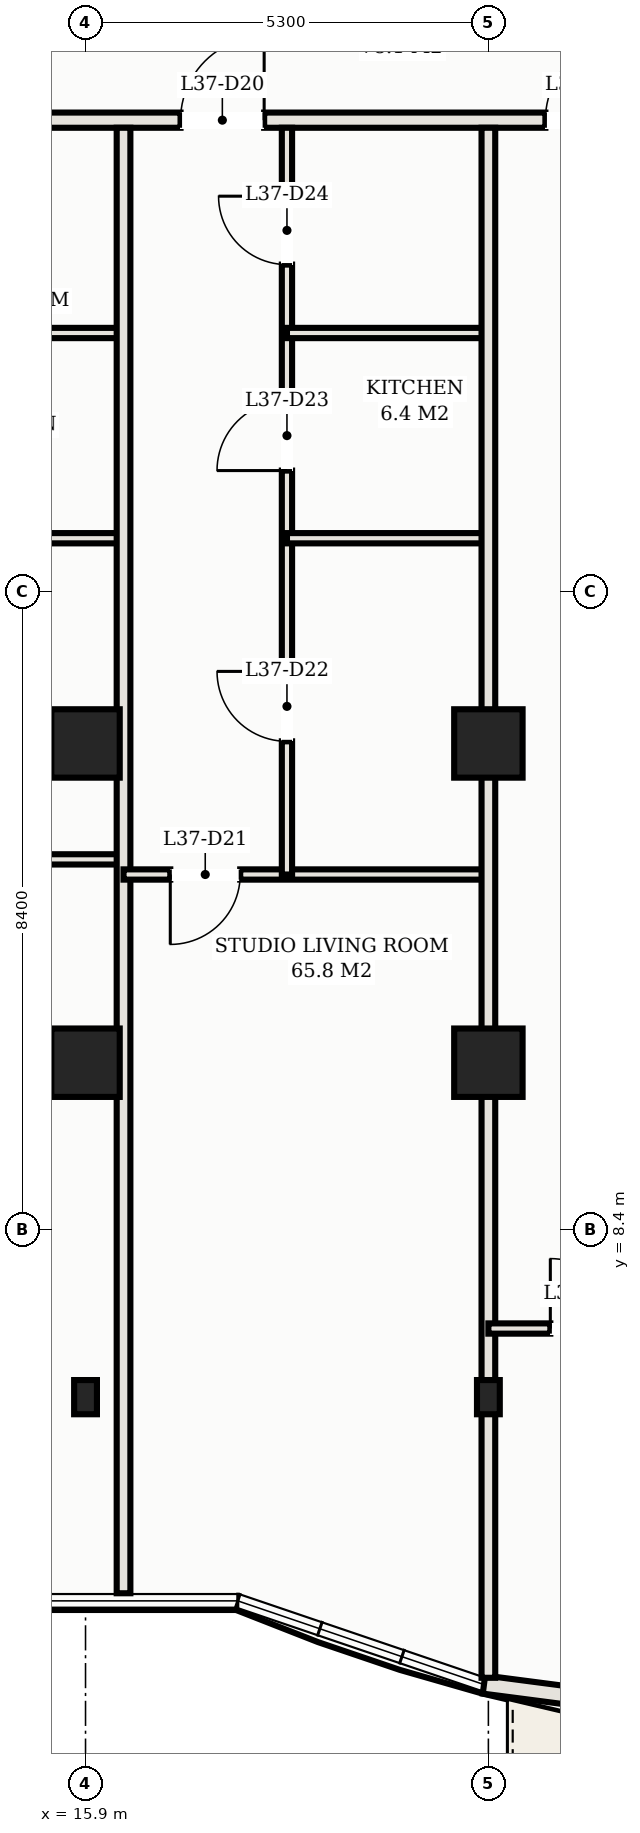
"""IFC4 building model, lengths in metres.
Left out: names, types, materials, properties, quantities, classifications, styles, units other than length and angle.
Written with IfcOpenShell. Run it as: python <this file> out.ifc"""

import sys

from ifc_helpers import new_model, si_unit, direction, frame, frame_2d, origin, origin_2d, place, context, subcontext, project, spatial, rectangle, hollow_rectangle, extrude, element, fill, save


model = new_model("IFC4")
c1 = context("Model", 3, precision=1e-05, world=origin(), true_north=direction((0.0, 1.0)))
c2 = subcontext(c1, "Body", "Model", "MODEL_VIEW")
j1 = project(units=[si_unit("LENGTHUNIT", "METRE"), si_unit("PLANEANGLEUNIT", "RADIAN")], contexts=[c1])
p1 = place(None, origin())
s1 = spatial("IfcSite", under=j1, at=p1, CompositionType="ELEMENT")
p2 = place(p1, origin())
s2 = spatial("IfcBuilding", under=s1, at=p2, CompositionType="ELEMENT")
p3 = place(p2, frame((0.0, 0.0, 139.2)))
s3 = spatial("IfcBuildingStorey", under=s2, at=p3, CompositionType="ELEMENT", Elevation=139.2)
for number, where, z_axis, x_axis in (
    (1, (15.9, 14.8, 0.0), (0.0, 0.0, 1.0), (1.0, 0.0, 0.0)),
    (2, (15.9, 10.6, 0.0), (0.0, 0.0, 1.0), (1.0, 0.0, 0.0)),
    (3, (21.2, 14.8, 0.0), (0.0, 0.0, 1.0), (1.0, 0.0, 0.0)),
    (4, (21.2, 10.6, 0.0), (0.0, 0.0, 1.0), (1.0, 0.0, 0.0)),
):
    element("IfcColumn", number, at=place(p3, frame(where, z_axis=z_axis, x_axis=x_axis)), inside=s3, PredefinedType="COLUMN", context=c2, shape_type="SweptSolid", body=[
        extrude(hollow_rectangle(XDim=0.9, YDim=0.9, WallThickness=0.032, at=origin_2d()), origin(), (0.0, 0.0, 1.0), 3.3),
    ])
for number, where, z_axis, x_axis in (
    (5, (15.9, 6.2, 0.0), (0.0, 0.0, 1.0), (1.0, 0.0, 0.0)),
    (6, (21.2, 6.2, 0.0), (0.0, 0.0, 1.0), (1.0, 0.0, 0.0)),
):
    element("IfcColumn", number, at=place(p3, frame(where, z_axis=z_axis, x_axis=x_axis)), inside=s3, PredefinedType="COLUMN", context=c2, shape_type="SweptSolid", body=[
        extrude(hollow_rectangle(XDim=0.3, YDim=0.45, WallThickness=0.016, at=origin_2d()), origin(), (0.0, 0.0, 1.0), 3.3),
    ])
p4 = place(p3, frame((21.142, 2.419, 0.0), z_axis=(0.0, 0.0, 1.0), x_axis=(0.991597639478, -0.129360432053, 0.0)))
e7 = element("IfcWall", 7, at=p4, inside=s3, PredefinedType="SOLIDWALL", context=c2, shape_type="SweptSolid", body=[
    extrude(rectangle(XDim=5.403, YDim=0.24, at=frame_2d((2.702, 0.0))), origin(), (0.0, 0.0, 1.0), 3.1),
])
p5 = place(p4, frame((1.672, 0.0, 0.0)))
e8 = element("IfcOpeningElement", 8, at=p5, cuts=e7, PredefinedType="OPENING", context=c2, shape_type="SweptSolid", body=[
    extrude(rectangle(XDim=1.8, YDim=2.2, at=frame_2d((0.9, 1.1))), frame((0.0, 0.13, 0.0), z_axis=(0.0, -1.0, 0.0), x_axis=(1.0, 0.0, 0.0)), (0.0, 0.0, 1.0), 0.26),
])
p6 = place(p3, frame((4.32, 23.0, 0.0), z_axis=(0.0, 0.0, 1.0), x_axis=(1.0, 0.0, 0.0)))
e9 = element("IfcWall", 9, at=p6, inside=s3, PredefinedType="PARTITIONING", context=c2, shape_type="SweptSolid", body=[
    extrude(rectangle(XDim=44.36, YDim=0.2, at=frame_2d((22.18, 0.0))), origin(), (0.0, 0.0, 1.0), 2.38),
])
p7 = place(p6, frame((7.03, 0.0, 0.0)))
e10 = element("IfcOpeningElement", 10, at=p7, cuts=e9, PredefinedType="OPENING", context=c2, shape_type="SweptSolid", body=[
    extrude(rectangle(XDim=1.1, YDim=2.25, at=frame_2d((0.55, 1.125))), frame((0.0, 0.11, 0.0), z_axis=(0.0, -1.0, 0.0), x_axis=(1.0, 0.0, 0.0)), (0.0, 0.0, 1.0), 0.22),
])
p8 = place(p6, frame((12.83, 0.0, 0.0)))
e11 = element("IfcOpeningElement", 11, at=p8, cuts=e9, PredefinedType="OPENING", context=c2, shape_type="SweptSolid", body=[
    extrude(rectangle(XDim=1.1, YDim=2.25, at=frame_2d((0.55, 1.125))), frame((0.0, 0.11, 0.0), z_axis=(0.0, -1.0, 0.0), x_axis=(1.0, 0.0, 0.0)), (0.0, 0.0, 1.0), 0.22),
])
p9 = place(p6, frame((17.63, 0.0, 0.0)))
e12 = element("IfcOpeningElement", 12, at=p9, cuts=e9, PredefinedType="OPENING", context=c2, shape_type="SweptSolid", body=[
    extrude(rectangle(XDim=1.1, YDim=2.25, at=frame_2d((0.55, 1.125))), frame((0.0, 0.11, 0.0), z_axis=(0.0, -1.0, 0.0), x_axis=(1.0, 0.0, 0.0)), (0.0, 0.0, 1.0), 0.22),
])
p10 = place(p6, frame((28.23, 0.0, 0.0)))
e13 = element("IfcOpeningElement", 13, at=p10, cuts=e9, PredefinedType="OPENING", context=c2, shape_type="SweptSolid", body=[
    extrude(rectangle(XDim=1.1, YDim=2.25, at=frame_2d((0.55, 1.125))), frame((0.0, 0.11, 0.0), z_axis=(0.0, -1.0, 0.0), x_axis=(1.0, 0.0, 0.0)), (0.0, 0.0, 1.0), 0.22),
])
p11 = place(p6, frame((2.635, 0.0, 0.0)))
e14 = element("IfcOpeningElement", 14, at=p11, cuts=e9, PredefinedType="OPENING", context=c2, shape_type="SweptSolid", body=[
    extrude(rectangle(XDim=0.92, YDim=2.15, at=frame_2d((0.46, 1.075))), frame((0.0, 0.11, 0.0), z_axis=(0.0, -1.0, 0.0), x_axis=(1.0, 0.0, 0.0)), (0.0, 0.0, 1.0), 0.22),
])
p12 = place(p6, frame((40.805, 0.0, 0.0)))
e15 = element("IfcOpeningElement", 15, at=p12, cuts=e9, PredefinedType="OPENING", context=c2, shape_type="SweptSolid", body=[
    extrude(rectangle(XDim=0.92, YDim=2.15, at=frame_2d((0.46, 1.075))), frame((0.0, 0.11, 0.0), z_axis=(0.0, -1.0, 0.0), x_axis=(1.0, 0.0, 0.0)), (0.0, 0.0, 1.0), 0.22),
])
p13 = place(p3, frame((10.6, 13.275, 0.0), z_axis=(0.0, 0.0, 1.0), x_axis=(1.0, 0.0, 0.0)))
e16 = element("IfcWall", 16, at=p13, inside=s3, PredefinedType="PARTITIONING", context=c2, shape_type="SweptSolid", body=[
    extrude(rectangle(XDim=5.8, YDim=0.135, at=frame_2d((2.9, 0.0))), origin(), (0.0, 0.0, 1.0), 2.38),
])
p14 = place(p13, frame((0.815, 0.0, 0.0)))
e17 = element("IfcOpeningElement", 17, at=p14, cuts=e16, PredefinedType="OPENING", context=c2, shape_type="SweptSolid", body=[
    extrude(rectangle(XDim=0.92, YDim=2.15, at=frame_2d((0.46, 1.075))), frame((0.0, 0.078, 0.0), z_axis=(0.0, -1.0, 0.0), x_axis=(1.0, 0.0, 0.0)), (0.0, 0.0, 1.0), 0.155),
])
for number, where, z_axis, x_axis in (
    (18, (12.75, 17.5, 0.0), (0.0, 0.0, 1.0), (1.0, 0.0, 0.0)),
    (19, (12.75, 20.2, 0.0), (0.0, 0.0, 1.0), (1.0, 0.0, 0.0)),
):
    element("IfcWall", number, at=place(p3, frame(where, z_axis=z_axis, x_axis=x_axis)), inside=s3, PredefinedType="PARTITIONING", context=c2, shape_type="SweptSolid", body=[
        extrude(rectangle(XDim=3.65, YDim=0.135, at=frame_2d((1.825, 0.0))), origin(), (0.0, 0.0, 1.0), 2.38),
    ])
p15 = place(p3, frame((16.4, 3.62, 0.0), z_axis=(0.0, 0.0, 1.0), x_axis=(0.0, 1.0, 0.0)))
e20 = element("IfcWall", 20, at=p15, inside=s3, PredefinedType="PARTITIONING", context=c2, shape_type="SweptSolid", body=[
    extrude(rectangle(XDim=19.28, YDim=0.18, at=frame_2d((9.64, 0.0))), origin(), (0.0, 0.0, 1.0), 2.38),
])
p16 = place(p3, frame((16.4, 13.076, 0.0), z_axis=(0.0, 0.0, 1.0), x_axis=(1.0, 0.0, 0.0)))
e21 = element("IfcWall", 21, at=p16, inside=s3, PredefinedType="PARTITIONING", context=c2, shape_type="SweptSolid", body=[
    extrude(rectangle(XDim=4.8, YDim=0.135, at=frame_2d((2.4, 0.0))), origin(), (0.0, 0.0, 1.0), 2.38),
])
p17 = place(p16, frame((0.615, 0.0, 0.0)))
e22 = element("IfcOpeningElement", 22, at=p17, cuts=e21, PredefinedType="OPENING", context=c2, shape_type="SweptSolid", body=[
    extrude(rectangle(XDim=0.92, YDim=2.15, at=frame_2d((0.46, 1.075))), frame((0.0, 0.078, 0.0), z_axis=(0.0, -1.0, 0.0), x_axis=(1.0, 0.0, 0.0)), (0.0, 0.0, 1.0), 0.155),
])
p18 = place(p3, frame((18.55, 13.076, 0.0), z_axis=(0.0, 0.0, 1.0), x_axis=(0.0, 1.0, 0.0)))
e23 = element("IfcWall", 23, at=p18, inside=s3, PredefinedType="PARTITIONING", context=c2, shape_type="SweptSolid", body=[
    extrude(rectangle(XDim=9.824, YDim=0.135, at=frame_2d((4.912, 0.0))), origin(), (0.0, 0.0, 1.0), 2.38),
])
p19 = place(p18, frame((1.752, 0.0, 0.0)))
e24 = element("IfcOpeningElement", 24, at=p19, cuts=e23, PredefinedType="OPENING", context=c2, shape_type="SweptSolid", body=[
    extrude(rectangle(XDim=0.92, YDim=2.15, at=frame_2d((0.46, 1.075))), frame((0.0, 0.078, 0.0), z_axis=(0.0, -1.0, 0.0), x_axis=(1.0, 0.0, 0.0)), (0.0, 0.0, 1.0), 0.155),
])
p20 = place(p18, frame((5.314, 0.0, 0.0)))
e25 = element("IfcOpeningElement", 25, at=p20, cuts=e23, PredefinedType="OPENING", context=c2, shape_type="SweptSolid", body=[
    extrude(rectangle(XDim=0.92, YDim=2.15, at=frame_2d((0.46, 1.075))), frame((0.0, 0.078, 0.0), z_axis=(0.0, -1.0, 0.0), x_axis=(1.0, 0.0, 0.0)), (0.0, 0.0, 1.0), 0.155),
])
p21 = place(p18, frame((8.024, 0.0, 0.0)))
e26 = element("IfcOpeningElement", 26, at=p21, cuts=e23, PredefinedType="OPENING", context=c2, shape_type="SweptSolid", body=[
    extrude(rectangle(XDim=0.9, YDim=2.15, at=frame_2d((0.45, 1.075))), frame((0.0, 0.078, 0.0), z_axis=(0.0, -1.0, 0.0), x_axis=(1.0, 0.0, 0.0)), (0.0, 0.0, 1.0), 0.155),
])
for number, where, z_axis, x_axis in (
    (27, (18.55, 17.5, 0.0), (0.0, 0.0, 1.0), (1.0, 0.0, 0.0)),
    (28, (18.55, 20.2, 0.0), (0.0, 0.0, 1.0), (1.0, 0.0, 0.0)),
):
    element("IfcWall", number, at=place(p3, frame(where, z_axis=z_axis, x_axis=x_axis)), inside=s3, PredefinedType="PARTITIONING", context=c2, shape_type="SweptSolid", body=[
        extrude(rectangle(XDim=2.65, YDim=0.135, at=frame_2d((1.325, 0.0))), origin(), (0.0, 0.0, 1.0), 2.38),
    ])
p22 = place(p3, frame((21.2, 2.508, 0.0), z_axis=(0.0, 0.0, 1.0), x_axis=(0.0, 1.0, 0.0)))
e29 = element("IfcWall", 29, at=p22, inside=s3, PredefinedType="PARTITIONING", context=c2, shape_type="SweptSolid", body=[
    extrude(rectangle(XDim=20.392, YDim=0.18, at=frame_2d((10.196, 0.0))), origin(), (0.0, 0.0, 1.0), 2.38),
])
p23 = place(p3, frame((21.2, 7.103, 0.0), z_axis=(0.0, 0.0, 1.0), x_axis=(1.0, 0.0, 0.0)))
e30 = element("IfcWall", 30, at=p23, inside=s3, PredefinedType="PARTITIONING", context=c2, shape_type="SweptSolid", body=[
    extrude(rectangle(XDim=10.6, YDim=0.135, at=frame_2d((5.3, 0.0))), origin(), (0.0, 0.0, 1.0), 2.38),
])
p24 = place(p23, frame((0.815, 0.0, 0.0)))
e31 = element("IfcOpeningElement", 31, at=p24, cuts=e30, PredefinedType="OPENING", context=c2, shape_type="SweptSolid", body=[
    extrude(rectangle(XDim=0.92, YDim=2.15, at=frame_2d((0.46, 1.075))), frame((0.0, 0.078, 0.0), z_axis=(0.0, -1.0, 0.0), x_axis=(1.0, 0.0, 0.0)), (0.0, 0.0, 1.0), 0.155),
])
p25 = place(p8, origin())
e32 = element("IfcDoor", 32, at=p25, inside=s3, OperationType="SINGLE_SWING_RIGHT", PredefinedType="DOOR", context=c2, shape_type="SweptSolid", body=[
    extrude(rectangle(XDim=1.1, YDim=2.25, at=frame_2d((0.55, 1.125))), frame((0.0, 0.025, 0.0), z_axis=(0.0, -1.0, 0.0), x_axis=(1.0, 0.0, 0.0)), (0.0, 0.0, 1.0), 0.05),
])
fill(e11, e32)
p26 = place(p17, frame((0.92, 0.0, 0.0), z_axis=(0.0, 0.0, 1.0), x_axis=(-1.0, 0.0, 0.0)))
e33 = element("IfcDoor", 33, at=p26, inside=s3, OperationType="SINGLE_SWING_RIGHT", PredefinedType="DOOR", context=c2, shape_type="SweptSolid", body=[
    extrude(rectangle(XDim=0.92, YDim=2.15, at=frame_2d((0.46, 1.075))), frame((0.0, 0.025, 0.0), z_axis=(0.0, -1.0, 0.0), x_axis=(1.0, 0.0, 0.0)), (0.0, 0.0, 1.0), 0.05),
])
fill(e22, e33)
p27 = place(p19, origin())
e34 = element("IfcDoor", 34, at=p27, inside=s3, OperationType="SINGLE_SWING_RIGHT", PredefinedType="DOOR", context=c2, shape_type="SweptSolid", body=[
    extrude(rectangle(XDim=0.92, YDim=2.15, at=frame_2d((0.46, 1.075))), frame((0.0, 0.025, 0.0), z_axis=(0.0, -1.0, 0.0), x_axis=(1.0, 0.0, 0.0)), (0.0, 0.0, 1.0), 0.05),
])
fill(e24, e34)
p28 = place(p20, origin())
e35 = element("IfcDoor", 35, at=p28, inside=s3, OperationType="SINGLE_SWING_LEFT", PredefinedType="DOOR", context=c2, shape_type="SweptSolid", body=[
    extrude(rectangle(XDim=0.92, YDim=2.15, at=frame_2d((0.46, 1.075))), frame((0.0, 0.025, 0.0), z_axis=(0.0, -1.0, 0.0), x_axis=(1.0, 0.0, 0.0)), (0.0, 0.0, 1.0), 0.05),
])
fill(e25, e35)
p29 = place(p21, origin())
e36 = element("IfcDoor", 36, at=p29, inside=s3, OperationType="SINGLE_SWING_RIGHT", PredefinedType="DOOR", context=c2, shape_type="SweptSolid", body=[
    extrude(rectangle(XDim=0.9, YDim=2.15, at=frame_2d((0.45, 1.075))), frame((0.0, 0.025, 0.0), z_axis=(0.0, -1.0, 0.0), x_axis=(1.0, 0.0, 0.0)), (0.0, 0.0, 1.0), 0.05),
])
fill(e26, e36)
p30 = place(p9, origin())
e37 = element("IfcDoor", 37, at=p30, inside=s3, OperationType="SINGLE_SWING_RIGHT", PredefinedType="DOOR", context=c2, shape_type="SweptSolid", body=[
    extrude(rectangle(XDim=1.1, YDim=2.25, at=frame_2d((0.55, 1.125))), frame((0.0, 0.025, 0.0), z_axis=(0.0, -1.0, 0.0), x_axis=(1.0, 0.0, 0.0)), (0.0, 0.0, 1.0), 0.05),
])
fill(e12, e37)
p31 = place(p24, origin())
e38 = element("IfcDoor", 38, at=p31, inside=s3, OperationType="SINGLE_SWING_LEFT", PredefinedType="DOOR", context=c2, shape_type="SweptSolid", body=[
    extrude(rectangle(XDim=0.92, YDim=2.15, at=frame_2d((0.46, 1.075))), frame((0.0, 0.025, 0.0), z_axis=(0.0, -1.0, 0.0), x_axis=(1.0, 0.0, 0.0)), (0.0, 0.0, 1.0), 0.05),
])
fill(e31, e38)
save(model, sys.argv[1])
